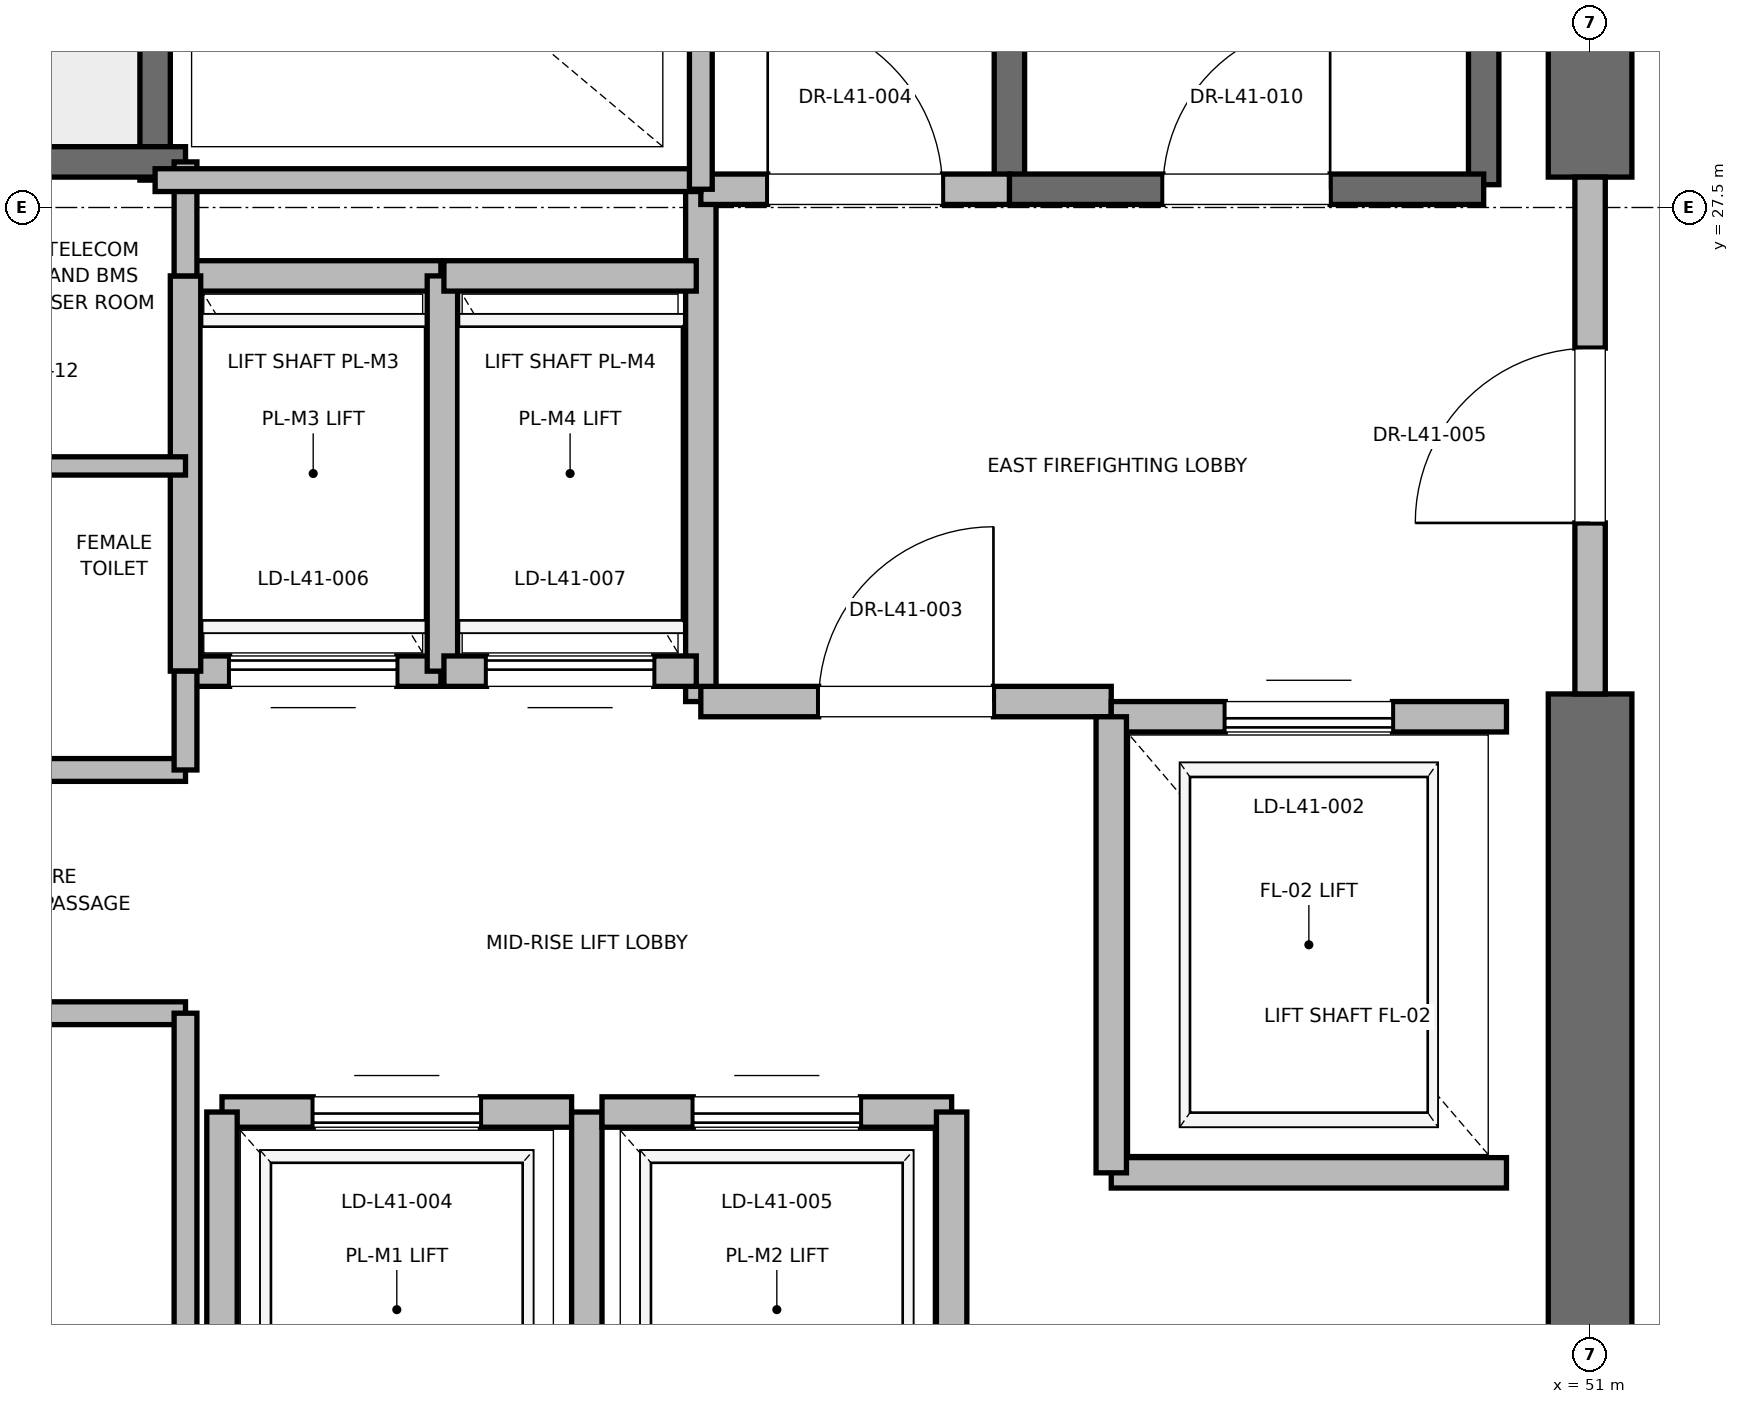
"""IFC4 building model, lengths in metres.
Left out: names, types, materials, properties, quantities, classifications, styles, units other than length and angle.
Written with IfcOpenShell. Run it as: python <this file> out.ifc"""

import sys

from ifc_helpers import new_model, si_unit, direction, frame, frame_2d, origin, place, context, subcontext, project, spatial, rectangle, extrude, element, fill, save


model = new_model("IFC4")
c1 = context("Model", 3, precision=1e-05, world=origin(), true_north=direction((0.0, 1.0)))
c2 = subcontext(c1, "Body", "Model", "MODEL_VIEW")
j1 = project(units=[si_unit("LENGTHUNIT", "METRE"), si_unit("PLANEANGLEUNIT", "RADIAN")], contexts=[c1])
p1 = place(None, origin())
s1 = spatial("IfcSite", under=j1, at=p1, CompositionType="ELEMENT")
p2 = place(p1, origin())
s2 = spatial("IfcBuilding", under=s1, at=p2, CompositionType="ELEMENT")
p3 = place(p2, frame((0.0, 0.0, 176.4)))
s3 = spatial("IfcBuildingStorey", under=s2, at=p3, CompositionType="ELEMENT", Elevation=176.4)
p4 = place(p3, frame((51.0, 18.5, 0.0), z_axis=(0.0, 0.0, 1.0), x_axis=(0.0, 1.0, 0.0)))
e1 = element("IfcWall", 1, at=p4, inside=s3, PredefinedType="SHEAR", context=c2, shape_type="SweptSolid", body=[
    extrude(rectangle(XDim=5.8, YDim=0.55, at=frame_2d((2.9, 0.0))), origin(), (0.0, 0.0, 1.0), 3.775),
])
p5 = place(p3, frame((51.0, 27.7, 0.0), z_axis=(0.0, 0.0, 1.0), x_axis=(0.0, 1.0, 0.0)))
e2 = element("IfcWall", 2, at=p5, inside=s3, PredefinedType="SHEAR", context=c2, shape_type="SweptSolid", body=[
    extrude(rectangle(XDim=8.8, YDim=0.55, at=frame_2d((4.4, 0.0))), origin(), (0.0, 0.0, 1.0), 3.775),
])
p6 = place(p3, frame((50.3, 27.65, 0.0), z_axis=(0.0, 0.0, 1.0), x_axis=(0.0, 1.0, 0.0)))
e3 = element("IfcWall", 3, at=p6, inside=s3, PredefinedType="SOLIDWALL", context=c2, shape_type="SweptSolid", body=[
    extrude(rectangle(XDim=8.15, YDim=0.2, at=frame_2d((4.075, 0.0))), origin(), (0.0, 0.0, 1.0), 3.775),
])
p7 = place(p3, frame((47.18, 27.62, 0.0), z_axis=(0.0, 0.0, 1.0), x_axis=(0.0, 1.0, 0.0)))
e4 = element("IfcWall", 4, at=p7, inside=s3, PredefinedType="SOLIDWALL", context=c2, shape_type="SweptSolid", body=[
    extrude(rectangle(XDim=8.18, YDim=0.2, at=frame_2d((4.09, 0.0))), origin(), (0.0, 0.0, 1.0), 3.775),
])
p8 = place(p3, frame((47.18, 27.62, 0.0), z_axis=(0.0, 0.0, 1.0), x_axis=(1.0, 0.0, 0.0)))
e5 = element("IfcWall", 5, at=p8, inside=s3, PredefinedType="SOLIDWALL", context=c2, shape_type="SweptSolid", body=[
    extrude(rectangle(XDim=3.12, YDim=0.2, at=frame_2d((1.56, 0.0))), origin(), (0.0, 0.0, 1.0), 3.775),
])
p9 = place(p8, frame((1.01, 0.0, 0.0)))
e6 = element("IfcOpeningElement", 6, at=p9, cuts=e5, PredefinedType="OPENING", context=c2, shape_type="SweptSolid", body=[
    extrude(rectangle(XDim=1.1, YDim=2.15, at=frame_2d((0.55, 1.075))), frame((0.0, 0.1, 0.0), z_axis=(0.0, -1.0, 0.0), x_axis=(1.0, 0.0, 0.0)), (0.0, 0.0, 1.0), 0.2),
])
p10 = place(p3, frame((41.56, 27.68, 0.0), z_axis=(0.0, 0.0, 1.0), x_axis=(0.0, 1.0, 0.0)))
e7 = element("IfcWall", 7, at=p10, inside=s3, PredefinedType="SOLIDWALL", context=c2, shape_type="SweptSolid", body=[
    extrude(rectangle(XDim=8.57, YDim=0.2, at=frame_2d((4.285, 0.0))), origin(), (0.0, 0.0, 1.0), 3.775),
])
p11 = place(p3, frame((38.44, 27.8, 0.0), z_axis=(0.0, 0.0, 1.0), x_axis=(1.0, 0.0, 0.0)))
e8 = element("IfcWall", 8, at=p11, inside=s3, PredefinedType="SOLIDWALL", context=c2, shape_type="SweptSolid", body=[
    extrude(rectangle(XDim=3.32, YDim=0.2, at=frame_2d((1.66, 0.0))), origin(), (0.0, 0.0, 1.0), 3.775),
])
p12 = place(p3, frame((45.15, 24.25, 0.0), z_axis=(0.0, 0.0, 1.0), x_axis=(0.0, 1.0, 0.0)))
e9 = element("IfcWall", 9, at=p12, inside=s3, PredefinedType="PARTITIONING", context=c2, shape_type="SweptSolid", body=[
    extrude(rectangle(XDim=3.37, YDim=0.2, at=frame_2d((1.685, 0.0))), origin(), (0.0, 0.0, 1.0), 3.775),
])
p13 = place(p3, frame((45.15, 24.25, 0.0), z_axis=(0.0, 0.0, 1.0), x_axis=(1.0, 0.0, 0.0)))
e10 = element("IfcWall", 10, at=p13, inside=s3, PredefinedType="PARTITIONING", context=c2, shape_type="SweptSolid", body=[
    extrude(rectangle(XDim=2.7, YDim=0.2, at=frame_2d((1.35, 0.0))), origin(), (0.0, 0.0, 1.0), 3.775),
])
p14 = place(p13, frame((0.775, 0.0, 0.0)))
e11 = element("IfcOpeningElement", 11, at=p14, cuts=e10, PredefinedType="OPENING", context=c2, shape_type="SweptSolid", body=[
    extrude(rectangle(XDim=1.15, YDim=2.2, at=frame_2d((0.575, 1.1))), frame((0.0, 0.1, 0.0), z_axis=(0.0, -1.0, 0.0), x_axis=(1.0, 0.0, 0.0)), (0.0, 0.0, 1.0), 0.2),
])
p15 = place(p3, frame((45.15, 27.62, 0.0), z_axis=(0.0, 0.0, 1.0), x_axis=(1.0, 0.0, 0.0)))
e12 = element("IfcWall", 12, at=p15, inside=s3, PredefinedType="PARTITIONING", context=c2, shape_type="SweptSolid", body=[
    extrude(rectangle(XDim=2.03, YDim=0.2, at=frame_2d((1.015, 0.0))), origin(), (0.0, 0.0, 1.0), 3.775),
])
p16 = place(p15, frame((0.44, 0.0, 0.0)))
e13 = element("IfcOpeningElement", 13, at=p16, cuts=e12, PredefinedType="OPENING", context=c2, shape_type="SweptSolid", body=[
    extrude(rectangle(XDim=1.15, YDim=2.2, at=frame_2d((0.575, 1.1))), frame((0.0, 0.1, 0.0), z_axis=(0.0, -1.0, 0.0), x_axis=(1.0, 0.0, 0.0)), (0.0, 0.0, 1.0), 0.2),
])
p17 = place(p3, frame((51.0, 24.3, 0.0), z_axis=(0.0, 0.0, 1.0), x_axis=(0.0, 1.0, 0.0)))
e14 = element("IfcWall", 14, at=p17, inside=s3, PredefinedType="PARTITIONING", context=c2, shape_type="SweptSolid", body=[
    extrude(rectangle(XDim=3.4, YDim=0.2, at=frame_2d((1.7, 0.0))), origin(), (0.0, 0.0, 1.0), 2.755),
])
p18 = place(p17, frame((1.125, 0.0, 0.0)))
e15 = element("IfcOpeningElement", 15, at=p18, cuts=e14, PredefinedType="OPENING", context=c2, shape_type="SweptSolid", body=[
    extrude(rectangle(XDim=1.15, YDim=2.2, at=frame_2d((0.575, 1.1))), frame((0.0, 0.1, 0.0), z_axis=(0.0, -1.0, 0.0), x_axis=(1.0, 0.0, 0.0)), (0.0, 0.0, 1.0), 0.2),
])
p19 = place(p3, frame((47.85, 21.15, 0.0), z_axis=(0.0, 0.0, 1.0), x_axis=(1.0, 0.0, 0.0)))
e16 = element("IfcWall", 16, at=p19, inside=s3, PredefinedType="SOLIDWALL", context=c2, shape_type="SweptSolid", body=[
    extrude(rectangle(XDim=2.6, YDim=0.2, at=frame_2d((1.3, 0.0))), origin(), (0.0, 0.0, 1.0), 3.775),
])
p20 = place(p3, frame((50.45, 24.15, 0.0), z_axis=(0.0, 0.0, 1.0), x_axis=(-1.0, 0.0, 0.0)))
e17 = element("IfcWall", 17, at=p20, inside=s3, PredefinedType="SOLIDWALL", context=c2, shape_type="SweptSolid", body=[
    extrude(rectangle(XDim=2.6, YDim=0.2, at=frame_2d((1.3, 0.0))), origin(), (0.0, 0.0, 1.0), 2.755),
])
p21 = place(p20, frame((0.75, 0.0, 0.0)))
e18 = element("IfcOpeningElement", 18, at=p21, cuts=e17, PredefinedType="OPENING", context=c2, shape_type="SweptSolid", body=[
    extrude(rectangle(XDim=1.1, YDim=2.2, at=frame_2d((0.55, 1.1))), frame((0.0, 0.1, 0.0), z_axis=(0.0, -1.0, 0.0), x_axis=(1.0, 0.0, 0.0)), (0.0, 0.0, 1.0), 0.2),
])
p22 = place(p3, frame((47.85, 24.15, 0.0), z_axis=(0.0, 0.0, 1.0), x_axis=(0.0, -1.0, 0.0)))
e19 = element("IfcWall", 19, at=p22, inside=s3, PredefinedType="SOLIDWALL", context=c2, shape_type="SweptSolid", body=[
    extrude(rectangle(XDim=3.0, YDim=0.2, at=frame_2d((1.5, 0.0))), origin(), (0.0, 0.0, 1.0), 3.775),
])
p23 = place(p3, frame((44.3, 21.55, 0.0), z_axis=(0.0, 0.0, 1.0), x_axis=(-1.0, 0.0, 0.0)))
e20 = element("IfcWall", 20, at=p23, inside=s3, PredefinedType="SOLIDWALL", context=c2, shape_type="SweptSolid", body=[
    extrude(rectangle(XDim=2.3, YDim=0.2, at=frame_2d((1.15, 0.0))), origin(), (0.0, 0.0, 1.0), 3.775),
])
p24 = place(p23, frame((0.6, 0.0, 0.0)))
e21 = element("IfcOpeningElement", 21, at=p24, cuts=e20, PredefinedType="OPENING", context=c2, shape_type="SweptSolid", body=[
    extrude(rectangle(XDim=1.1, YDim=2.2, at=frame_2d((0.55, 1.1))), frame((0.0, 0.1, 0.0), z_axis=(0.0, -1.0, 0.0), x_axis=(1.0, 0.0, 0.0)), (0.0, 0.0, 1.0), 0.2),
])
p25 = place(p3, frame((42.0, 21.55, 0.0), z_axis=(0.0, 0.0, 1.0), x_axis=(0.0, -1.0, 0.0)))
e22 = element("IfcWall", 22, at=p25, inside=s3, PredefinedType="SOLIDWALL", context=c2, shape_type="SweptSolid", body=[
    extrude(rectangle(XDim=2.6, YDim=0.2, at=frame_2d((1.3, 0.0))), origin(), (0.0, 0.0, 1.0), 2.755),
])
p26 = place(p3, frame((44.4, 18.95, 0.0), z_axis=(0.0, 0.0, 1.0), x_axis=(0.0, 1.0, 0.0)))
e23 = element("IfcWall", 23, at=p26, inside=s3, PredefinedType="SOLIDWALL", context=c2, shape_type="SweptSolid", body=[
    extrude(rectangle(XDim=2.6, YDim=0.2, at=frame_2d((1.3, 0.0))), origin(), (0.0, 0.0, 1.0), 3.775),
])
p27 = place(p3, frame((46.8, 21.55, 0.0), z_axis=(0.0, 0.0, 1.0), x_axis=(-1.0, 0.0, 0.0)))
e24 = element("IfcWall", 24, at=p27, inside=s3, PredefinedType="SOLIDWALL", context=c2, shape_type="SweptSolid", body=[
    extrude(rectangle(XDim=2.3, YDim=0.2, at=frame_2d((1.15, 0.0))), origin(), (0.0, 0.0, 1.0), 3.775),
])
p28 = place(p27, frame((0.6, 0.0, 0.0)))
e25 = element("IfcOpeningElement", 25, at=p28, cuts=e24, PredefinedType="OPENING", context=c2, shape_type="SweptSolid", body=[
    extrude(rectangle(XDim=1.1, YDim=2.2, at=frame_2d((0.55, 1.1))), frame((0.0, 0.1, 0.0), z_axis=(0.0, -1.0, 0.0), x_axis=(1.0, 0.0, 0.0)), (0.0, 0.0, 1.0), 0.2),
])
p29 = place(p3, frame((46.8, 18.95, 0.0), z_axis=(0.0, 0.0, 1.0), x_axis=(0.0, 1.0, 0.0)))
e26 = element("IfcWall", 26, at=p29, inside=s3, PredefinedType="SOLIDWALL", context=c2, shape_type="SweptSolid", body=[
    extrude(rectangle(XDim=2.6, YDim=0.2, at=frame_2d((1.3, 0.0))), origin(), (0.0, 0.0, 1.0), 3.775),
])
p30 = place(p3, frame((41.76, 24.45, 0.0), z_axis=(0.0, 0.0, 1.0), x_axis=(1.0, 0.0, 0.0)))
e27 = element("IfcWall", 27, at=p30, inside=s3, PredefinedType="SOLIDWALL", context=c2, shape_type="SweptSolid", body=[
    extrude(rectangle(XDim=1.68, YDim=0.2, at=frame_2d((0.84, 0.0))), origin(), (0.0, 0.0, 1.0), 3.775),
])
p31 = place(p30, frame((0.29, 0.0, 0.0)))
e28 = element("IfcOpeningElement", 28, at=p31, cuts=e27, PredefinedType="OPENING", context=c2, shape_type="SweptSolid", body=[
    extrude(rectangle(XDim=1.1, YDim=2.2, at=frame_2d((0.55, 1.1))), frame((0.0, 0.1, 0.0), z_axis=(0.0, -1.0, 0.0), x_axis=(1.0, 0.0, 0.0)), (0.0, 0.0, 1.0), 0.2),
])
p32 = place(p3, frame((43.44, 27.05, 0.0), z_axis=(0.0, 0.0, 1.0), x_axis=(-1.0, 0.0, 0.0)))
e29 = element("IfcWall", 29, at=p32, inside=s3, PredefinedType="SOLIDWALL", context=c2, shape_type="SweptSolid", body=[
    extrude(rectangle(XDim=1.68, YDim=0.2, at=frame_2d((0.84, 0.0))), origin(), (0.0, 0.0, 1.0), 3.775),
])
for number, where, z_axis, x_axis in (
    (30, (41.76, 27.05, 0.0), (0.0, 0.0, 1.0), (0.0, -1.0, 0.0)),
    (31, (43.45, 24.45, 0.0), (0.0, 0.0, 1.0), (0.0, 1.0, 0.0)),
):
    element("IfcWall", number, at=place(p3, frame(where, z_axis=z_axis, x_axis=x_axis)), inside=s3, PredefinedType="SOLIDWALL", context=c2, shape_type="SweptSolid", body=[
        extrude(rectangle(XDim=2.6, YDim=0.2, at=frame_2d((1.3, 0.0))), origin(), (0.0, 0.0, 1.0), 3.775),
    ])
p33 = place(p3, frame((43.46, 24.45, 0.0), z_axis=(0.0, 0.0, 1.0), x_axis=(1.0, 0.0, 0.0)))
e32 = element("IfcWall", 32, at=p33, inside=s3, PredefinedType="SOLIDWALL", context=c2, shape_type="SweptSolid", body=[
    extrude(rectangle(XDim=1.66, YDim=0.2, at=frame_2d((0.83, 0.0))), origin(), (0.0, 0.0, 1.0), 3.775),
])
p34 = place(p33, frame((0.28, 0.0, 0.0)))
e33 = element("IfcOpeningElement", 33, at=p34, cuts=e32, PredefinedType="OPENING", context=c2, shape_type="SweptSolid", body=[
    extrude(rectangle(XDim=1.1, YDim=2.2, at=frame_2d((0.55, 1.1))), frame((0.0, 0.1, 0.0), z_axis=(0.0, -1.0, 0.0), x_axis=(1.0, 0.0, 0.0)), (0.0, 0.0, 1.0), 0.2),
])
p35 = place(p3, frame((45.12, 27.05, 0.0), z_axis=(0.0, 0.0, 1.0), x_axis=(-1.0, 0.0, 0.0)))
e34 = element("IfcWall", 34, at=p35, inside=s3, PredefinedType="SOLIDWALL", context=c2, shape_type="SweptSolid", body=[
    extrude(rectangle(XDim=1.66, YDim=0.2, at=frame_2d((0.83, 0.0))), origin(), (0.0, 0.0, 1.0), 3.775),
])
for number, where, z_axis, x_axis in (
    (35, (39.95, 22.2, 0.0), (0.0, 0.0, 1.0), (1.0, 0.0, 0.0)),
    (36, (39.95, 23.8, 0.0), (0.0, 0.0, 1.0), (1.0, 0.0, 0.0)),
):
    element("IfcWall", number, at=place(p3, frame(where, z_axis=z_axis, x_axis=x_axis)), inside=s3, PredefinedType="PARTITIONING", context=c2, shape_type="SweptSolid", body=[
        extrude(rectangle(XDim=1.81, YDim=0.15, at=frame_2d((0.905, 0.0))), origin(), (0.0, 0.0, 1.0), 2.85),
    ])
p36 = place(p3, frame((39.95, 25.8, 0.0), z_axis=(0.0, 0.0, 1.0), x_axis=(1.0, 0.0, 0.0)))
e37 = element("IfcWall", 37, at=p36, inside=s3, PredefinedType="PARTITIONING", context=c2, shape_type="SweptSolid", body=[
    extrude(rectangle(XDim=1.81, YDim=0.12, at=frame_2d((0.905, 0.0))), origin(), (0.0, 0.0, 1.0), 2.85),
])
p37 = place(p3, frame((41.76, 18.6, 0.0), z_axis=(0.0, 0.0, 1.0), x_axis=(0.0, 1.0, 0.0)))
e38 = element("IfcWall", 38, at=p37, inside=s3, PredefinedType="PARTITIONING", context=c2, shape_type="SweptSolid", body=[
    extrude(rectangle(XDim=3.6, YDim=0.15, at=frame_2d((1.8, 0.0))), origin(), (0.0, 0.0, 1.0), 2.755),
])
p38 = place(p3, frame((41.76, 23.8, 0.0), z_axis=(0.0, 0.0, 1.0), x_axis=(0.0, 1.0, 0.0)))
e39 = element("IfcWall", 39, at=p38, inside=s3, PredefinedType="PARTITIONING", context=c2, shape_type="SweptSolid", body=[
    extrude(rectangle(XDim=0.65, YDim=0.15, at=frame_2d((0.325, 0.0))), origin(), (0.0, 0.0, 1.0), 2.85),
])
p39 = place(p3, frame((41.76, 27.05, 0.0), z_axis=(0.0, 0.0, 1.0), x_axis=(0.0, 1.0, 0.0)))
e40 = element("IfcWall", 40, at=p39, inside=s3, PredefinedType="PARTITIONING", context=c2, shape_type="SweptSolid", body=[
    extrude(rectangle(XDim=0.75, YDim=0.15, at=frame_2d((0.375, 0.0))), origin(), (0.0, 0.0, 1.0), 2.85),
])
p40 = place(p3, frame((41.56, 27.68, 0.0), z_axis=(0.0, 0.0, 1.0), x_axis=(1.0, 0.0, 0.0)))
e41 = element("IfcWall", 41, at=p40, inside=s3, PredefinedType="PARTITIONING", context=c2, shape_type="SweptSolid", body=[
    extrude(rectangle(XDim=3.59, YDim=0.15, at=frame_2d((1.795, 0.0))), origin(), (0.0, 0.0, 1.0), 2.85),
])
p41 = place(p3, frame((45.15, 27.62, 0.0), z_axis=(0.0, 0.0, 1.0), x_axis=(0.0, 1.0, 0.0)))
e42 = element("IfcWall", 42, at=p41, inside=s3, PredefinedType="PARTITIONING", context=c2, shape_type="SweptSolid", body=[
    extrude(rectangle(XDim=3.1, YDim=0.15, at=frame_2d((1.55, 0.0))), origin(), (0.0, 0.0, 1.0), 2.85),
])
p42 = place(p9, origin())
e43 = element("IfcDoor", 43, at=p42, inside=s3, OperationType="SINGLE_SWING_RIGHT", PredefinedType="DOOR", context=c2, shape_type="SweptSolid", body=[
    extrude(rectangle(XDim=1.1, YDim=2.15, at=frame_2d((0.55, 1.075))), frame((0.0, 0.025, 0.0), z_axis=(0.0, -1.0, 0.0), x_axis=(1.0, 0.0, 0.0)), (0.0, 0.0, 1.0), 0.05),
])
fill(e6, e43)
p43 = place(p14, origin())
e44 = element("IfcDoor", 44, at=p43, inside=s3, OperationType="SINGLE_SWING_RIGHT", PredefinedType="DOOR", context=c2, shape_type="SweptSolid", body=[
    extrude(rectangle(XDim=1.15, YDim=2.2, at=frame_2d((0.575, 1.1))), frame((0.0, 0.025, 0.0), z_axis=(0.0, -1.0, 0.0), x_axis=(1.0, 0.0, 0.0)), (0.0, 0.0, 1.0), 0.05),
])
fill(e11, e44)
p44 = place(p16, origin())
e45 = element("IfcDoor", 45, at=p44, inside=s3, OperationType="SINGLE_SWING_LEFT", PredefinedType="DOOR", context=c2, shape_type="SweptSolid", body=[
    extrude(rectangle(XDim=1.15, YDim=2.2, at=frame_2d((0.575, 1.1))), frame((0.0, 0.025, 0.0), z_axis=(0.0, -1.0, 0.0), x_axis=(1.0, 0.0, 0.0)), (0.0, 0.0, 1.0), 0.05),
])
fill(e13, e45)
p45 = place(p18, origin())
e46 = element("IfcDoor", 46, at=p45, inside=s3, OperationType="SINGLE_SWING_LEFT", PredefinedType="DOOR", context=c2, shape_type="SweptSolid", body=[
    extrude(rectangle(XDim=1.15, YDim=2.2, at=frame_2d((0.575, 1.1))), frame((0.0, 0.025, 0.0), z_axis=(0.0, -1.0, 0.0), x_axis=(1.0, 0.0, 0.0)), (0.0, 0.0, 1.0), 0.05),
])
fill(e15, e46)
p46 = place(p21, origin())
e47 = element("IfcDoor", 47, at=p46, inside=s3, OperationType="SLIDING_TO_RIGHT", PredefinedType="DOOR", context=c2, shape_type="SweptSolid", body=[
    extrude(rectangle(XDim=1.1, YDim=2.2, at=frame_2d((0.55, 1.1))), frame((0.0, 0.025, 0.0), z_axis=(0.0, -1.0, 0.0), x_axis=(1.0, 0.0, 0.0)), (0.0, 0.0, 1.0), 0.05),
])
fill(e18, e47)
p47 = place(p24, origin())
e48 = element("IfcDoor", 48, at=p47, inside=s3, OperationType="SLIDING_TO_RIGHT", PredefinedType="DOOR", context=c2, shape_type="SweptSolid", body=[
    extrude(rectangle(XDim=1.1, YDim=2.2, at=frame_2d((0.55, 1.1))), frame((0.0, 0.025, 0.0), z_axis=(0.0, -1.0, 0.0), x_axis=(1.0, 0.0, 0.0)), (0.0, 0.0, 1.0), 0.05),
])
fill(e21, e48)
p48 = place(p28, origin())
e49 = element("IfcDoor", 49, at=p48, inside=s3, OperationType="SLIDING_TO_RIGHT", PredefinedType="DOOR", context=c2, shape_type="SweptSolid", body=[
    extrude(rectangle(XDim=1.1, YDim=2.2, at=frame_2d((0.55, 1.1))), frame((0.0, 0.025, 0.0), z_axis=(0.0, -1.0, 0.0), x_axis=(1.0, 0.0, 0.0)), (0.0, 0.0, 1.0), 0.05),
])
fill(e25, e49)
p49 = place(p31, origin())
e50 = element("IfcDoor", 50, at=p49, inside=s3, OperationType="SLIDING_TO_RIGHT", PredefinedType="DOOR", context=c2, shape_type="SweptSolid", body=[
    extrude(rectangle(XDim=1.1, YDim=2.2, at=frame_2d((0.55, 1.1))), frame((0.0, 0.025, 0.0), z_axis=(0.0, -1.0, 0.0), x_axis=(1.0, 0.0, 0.0)), (0.0, 0.0, 1.0), 0.05),
])
fill(e28, e50)
p50 = place(p34, origin())
e51 = element("IfcDoor", 51, at=p50, inside=s3, OperationType="SLIDING_TO_RIGHT", PredefinedType="DOOR", context=c2, shape_type="SweptSolid", body=[
    extrude(rectangle(XDim=1.1, YDim=2.2, at=frame_2d((0.55, 1.1))), frame((0.0, 0.025, 0.0), z_axis=(0.0, -1.0, 0.0), x_axis=(1.0, 0.0, 0.0)), (0.0, 0.0, 1.0), 0.05),
])
fill(e33, e51)
save(model, sys.argv[1])
